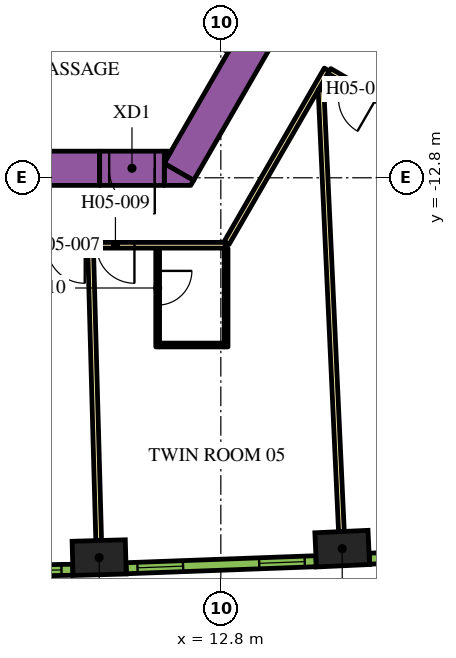
"""IFC4 building model, lengths in metres.
Left out: names, types, materials, properties, quantities, classifications, styles, units other than length and angle.
Written with IfcOpenShell. Run it as: python <this file> out.ifc"""

import sys

from ifc_helpers import new_model, si_unit, direction, frame, frame_2d, origin, origin_2d, place, context, subcontext, project, spatial, polyline, rectangle, outline, extrude, element, fill, save


model = new_model("IFC4")
c1 = context("Model", 3, precision=1e-05, world=origin(), true_north=direction((0.0, 1.0)))
c2 = subcontext(c1, "Body", "Model", "MODEL_VIEW")
j1 = project(units=[si_unit("LENGTHUNIT", "METRE"), si_unit("PLANEANGLEUNIT", "RADIAN")], contexts=[c1])
p1 = place(None, origin())
s1 = spatial("IfcSite", under=j1, at=p1, CompositionType="ELEMENT")
p2 = place(p1, origin())
s2 = spatial("IfcBuilding", under=s1, at=p2, CompositionType="ELEMENT")
p3 = place(p2, frame((0.0, 0.0, 74.4)))
s3 = spatial("IfcBuildingStorey", under=s2, at=p3, CompositionType="ELEMENT", Elevation=74.4)
for number, where, z_axis, x_axis in (
    (1, (9.599, -22.795, 0.0), (0.0, 0.0, 1.0), (1.0, 0.028, 0.0)),
    (2, (15.994, -22.558, 0.0), (0.0, 0.0, 1.0), (0.999, 0.046, 0.0)),
):
    element("IfcColumn", number, at=place(p3, frame(where, z_axis=z_axis, x_axis=x_axis)), inside=s3, PredefinedType="COLUMN", context=c2, shape_type="SweptSolid", body=[
        extrude(rectangle(XDim=1.4, YDim=0.9, at=origin_2d()), origin(), (0.0, 0.0, 1.0), 3.9),
    ])
p4 = place(p3, frame((11.695, -12.644, 0.0), z_axis=(0.0, 0.0, 1.0), x_axis=(0.500010229568, 0.86601949766, 0.0)))
e3 = element("IfcWall", 3, at=p4, inside=s3, PredefinedType="SOLIDWALL", context=c2, shape_type="SweptSolid", body=[
    extrude(rectangle(XDim=9.326, YDim=0.9, at=frame_2d((4.663, 0.0))), origin(), (0.0, 0.0, 1.0), 3.9),
])
p5 = place(p3, origin())
e4 = element("IfcWall", 4, at=p5, inside=s3, PredefinedType="SOLIDWALL", context=c2, shape_type="SweptSolid", body=[
    extrude(outline(polyline([(12.009, -13.0), (11.312, -13.0), (11.312, -12.425), (12.083, -12.871), (12.009, -13.0)])), origin(), (0.0, 0.0, 1.0), 3.9),
])
e5 = element("IfcWall", 5, at=p5, inside=s3, PredefinedType="SOLIDWALL", context=c2, shape_type="SweptSolid", body=[
    extrude(outline(polyline([(11.489, -12.1), (11.312, -12.407), (11.312, -12.1), (11.489, -12.1)])), origin(), (0.0, 0.0, 1.0), 3.9),
])
p6 = place(p3, frame((-12.019, -12.55, 0.0), z_axis=(0.0, 0.0, 1.0), x_axis=(1.0, 0.0, 0.0)))
e6 = element("IfcWall", 6, at=p6, inside=s3, PredefinedType="SOLIDWALL", context=c2, shape_type="SweptSolid", body=[
    extrude(rectangle(XDim=21.63, YDim=0.9, at=frame_2d((10.815, 0.0))), origin(), (0.0, 0.0, 1.0), 3.9),
])
p7 = place(p3, frame((11.312, -12.55, 0.0), z_axis=(0.0, 0.0, 1.0), x_axis=(-1.0, 0.0, 0.0)))
e7 = element("IfcWall", 7, at=p7, inside=s3, PredefinedType="SOLIDWALL", context=c2, shape_type="SweptSolid", body=[
    extrude(rectangle(XDim=1.7, YDim=0.9, at=frame_2d((0.85, 0.0))), origin(), (0.0, 0.0, 1.0), 3.9),
])
p8 = place(p7, frame((0.25, 0.0, 0.0)))
e8 = element("IfcOpeningElement", 8, at=p8, cuts=e7, PredefinedType="OPENING", context=c2, shape_type="SweptSolid", body=[
    extrude(rectangle(XDim=1.2, YDim=2.1, at=frame_2d((0.6, 1.05))), frame((0.0, 0.46, 0.0), z_axis=(0.0, -1.0, 0.0), x_axis=(1.0, 0.0, 0.0)), (0.0, 0.0, 1.0), 0.92),
])
p9 = place(p3, frame((16.412, -8.523, 0.0), z_axis=(0.0, 0.0, 1.0), x_axis=(0.866022197818, -0.500005552856, 0.0)))
e9 = element("IfcWall", 9, at=p9, inside=s3, PredefinedType="PARTITIONING", context=c2, shape_type="SweptSolid", body=[
    extrude(rectangle(XDim=16.224, YDim=0.15, at=frame_2d((8.112, 0.0))), origin(), (0.0, 0.0, 1.0), 2.7),
])
p10 = place(p9, frame((4.223, 0.0, 0.0)))
e10 = element("IfcOpeningElement", 10, at=p10, cuts=e9, PredefinedType="OPENING", context=c2, shape_type="SweptSolid", body=[
    extrude(rectangle(XDim=1.0, YDim=2.1, at=frame_2d((0.5, 1.05))), frame((0.0, 0.085, 0.0), z_axis=(0.0, -1.0, 0.0), x_axis=(1.0, 0.0, 0.0)), (0.0, 0.0, 1.0), 0.17),
])
p11 = place(p3, frame((12.918, -14.575, 0.0), z_axis=(0.0, 0.0, 1.0), x_axis=(-1.0, 0.0, 0.0)))
e11 = element("IfcWall", 11, at=p11, inside=s3, PredefinedType="PARTITIONING", context=c2, shape_type="SweptSolid", body=[
    extrude(rectangle(XDim=25.766, YDim=0.15, at=frame_2d((12.883, 0.0))), origin(), (0.0, 0.0, 1.0), 2.7),
])
p12 = place(p11, frame((21.137, 0.0, 0.0)))
e12 = element("IfcOpeningElement", 12, at=p12, cuts=e11, PredefinedType="OPENING", context=c2, shape_type="SweptSolid", body=[
    extrude(rectangle(XDim=1.0, YDim=2.1, at=frame_2d((0.5, 1.05))), frame((0.0, 0.085, 0.0), z_axis=(0.0, -1.0, 0.0), x_axis=(1.0, 0.0, 0.0)), (0.0, 0.0, 1.0), 0.17),
])
p13 = place(p11, frame((3.699, 0.0, 0.0)))
e13 = element("IfcOpeningElement", 13, at=p13, cuts=e11, PredefinedType="OPENING", context=c2, shape_type="SweptSolid", body=[
    extrude(rectangle(XDim=1.0, YDim=2.1, at=frame_2d((0.5, 1.05))), frame((0.0, 0.085, 0.0), z_axis=(0.0, -1.0, 0.0), x_axis=(1.0, 0.0, 0.0)), (0.0, 0.0, 1.0), 0.17),
])
p14 = place(p11, frame((2.392, 0.0, 0.0)))
e14 = element("IfcOpeningElement", 14, at=p14, cuts=e11, PredefinedType="OPENING", context=c2, shape_type="SweptSolid", body=[
    extrude(rectangle(XDim=1.0, YDim=2.1, at=frame_2d((0.5, 1.05))), frame((0.0, 0.085, 0.0), z_axis=(0.0, -1.0, 0.0), x_axis=(1.0, 0.0, 0.0)), (0.0, 0.0, 1.0), 0.17),
])
p15 = place(p3, frame((15.587, -9.952, 0.0), z_axis=(0.0, 0.0, 1.0), x_axis=(-0.500016618951, -0.866015808616, 0.0)))
e15 = element("IfcWall", 15, at=p15, inside=s3, PredefinedType="PARTITIONING", context=c2, shape_type="SweptSolid", body=[
    extrude(rectangle(XDim=5.268, YDim=0.15, at=frame_2d((2.634, 0.0))), origin(), (0.0, 0.0, 1.0), 2.7),
])
p16 = place(p3, frame((29.638, -18.064, 0.0), z_axis=(0.0, 0.0, 1.0), x_axis=(-0.866026175601, 0.499998663172, 0.0)))
e16 = element("IfcWall", 16, at=p16, inside=s3, PredefinedType="PARTITIONING", context=c2, shape_type="SweptSolid", body=[
    extrude(rectangle(XDim=16.144, YDim=0.15, at=frame_2d((8.072, 0.0))), origin(), (0.0, 0.0, 1.0), 2.7),
])
p17 = place(p16, frame((14.714, 0.0, 0.0)))
e17 = element("IfcOpeningElement", 17, at=p17, cuts=e16, PredefinedType="OPENING", context=c2, shape_type="SweptSolid", body=[
    extrude(rectangle(XDim=1.0, YDim=2.1, at=frame_2d((0.5, 1.05))), frame((0.0, 0.085, 0.0), z_axis=(0.0, -1.0, 0.0), x_axis=(1.0, 0.0, 0.0)), (0.0, 0.0, 1.0), 0.17),
])
p18 = place(p16, frame((7.275, 0.0, 0.0)))
e18 = element("IfcOpeningElement", 18, at=p18, cuts=e16, PredefinedType="OPENING", context=c2, shape_type="SweptSolid", body=[
    extrude(rectangle(XDim=1.0, YDim=2.1, at=frame_2d((0.5, 1.05))), frame((0.0, 0.085, 0.0), z_axis=(0.0, -1.0, 0.0), x_axis=(1.0, 0.0, 0.0)), (0.0, 0.0, 1.0), 0.17),
])
p19 = place(p3, frame((9.586, -22.345, 0.0), z_axis=(0.0, 0.0, 1.0), x_axis=(-0.027722115646, 0.999615668297, 0.0)))
e19 = element("IfcWall", 19, at=p19, inside=s3, PredefinedType="PARTITIONING", context=c2, shape_type="SweptSolid", body=[
    extrude(rectangle(XDim=7.688, YDim=0.15, at=frame_2d((3.844, 0.0))), origin(), (0.0, 0.0, 1.0), 2.7),
])
p20 = place(p3, frame((15.973, -22.109, 0.0), z_axis=(0.0, 0.0, 1.0), x_axis=(-0.046191717129, 0.998932592955, 0.0)))
e20 = element("IfcWall", 20, at=p20, inside=s3, PredefinedType="PARTITIONING", context=c2, shape_type="SweptSolid", body=[
    extrude(rectangle(XDim=11.638, YDim=0.15, at=frame_2d((5.819, 0.0))), origin(), (0.0, 0.0, 1.0), 2.7),
])
p21 = place(p3, frame((11.138, -14.65, 0.0), z_axis=(0.0, 0.0, 1.0), x_axis=(0.0, -1.0, 0.0)))
e21 = element("IfcWall", 21, at=p21, inside=s3, PredefinedType="PARTITIONING", context=c2, shape_type="SweptSolid", body=[
    extrude(rectangle(XDim=2.6, YDim=0.1, at=frame_2d((1.3, 0.0))), origin(), (0.0, 0.0, 1.0), 2.7),
])
p22 = place(p21, frame((0.6, 0.0, 0.0)))
e22 = element("IfcOpeningElement", 22, at=p22, cuts=e21, PredefinedType="OPENING", context=c2, shape_type="SweptSolid", body=[
    extrude(rectangle(XDim=0.9, YDim=2.1, at=frame_2d((0.45, 1.05))), frame((0.0, 0.06, 0.0), z_axis=(0.0, -1.0, 0.0), x_axis=(1.0, 0.0, 0.0)), (0.0, 0.0, 1.0), 0.12),
])
p23 = place(p3, frame((11.188, -17.2, 0.0), z_axis=(0.0, 0.0, 1.0), x_axis=(1.0, 0.0, 0.0)))
e23 = element("IfcWall", 23, at=p23, inside=s3, PredefinedType="PARTITIONING", context=c2, shape_type="SweptSolid", body=[
    extrude(rectangle(XDim=1.7, YDim=0.1, at=frame_2d((0.85, 0.0))), origin(), (0.0, 0.0, 1.0), 2.7),
])
p24 = place(p3, frame((12.938, -14.65, 0.0), z_axis=(0.0, 0.0, 1.0), x_axis=(0.0, -1.0, 0.0)))
e24 = element("IfcWall", 24, at=p24, inside=s3, PredefinedType="PARTITIONING", context=c2, shape_type="SweptSolid", body=[
    extrude(rectangle(XDim=2.6, YDim=0.1, at=frame_2d((1.3, 0.0))), origin(), (0.0, 0.0, 1.0), 2.7),
])
p25 = place(p3, frame((3.906, -23.205, 0.0), z_axis=(0.0, 0.0, 1.0), x_axis=(0.999829529479, 0.018463801951, 0.0)))
e25 = element("IfcWall", 25, at=p25, inside=s3, PredefinedType="SOLIDWALL", context=c2, shape_type="SweptSolid", body=[
    extrude(rectangle(XDim=4.998, YDim=0.29, at=frame_2d((2.499, 0.0))), origin(), (0.0, 0.0, 1.0), 3.6),
])
p26 = place(p25, frame((0.297, 0.0, 0.9)))
e26 = element("IfcOpeningElement", 26, at=p26, cuts=e25, PredefinedType="OPENING", context=c2, shape_type="SweptSolid", body=[
    extrude(rectangle(XDim=1.2, YDim=2.15, at=frame_2d((0.6, 1.075))), frame((0.0, 0.155, 0.0), z_axis=(0.0, -1.0, 0.0), x_axis=(1.0, 0.0, 0.0)), (0.0, 0.0, 1.0), 0.31),
])
p27 = place(p25, frame((3.501, 0.0, 0.9)))
e27 = element("IfcOpeningElement", 27, at=p27, cuts=e25, PredefinedType="OPENING", context=c2, shape_type="SweptSolid", body=[
    extrude(rectangle(XDim=1.2, YDim=2.15, at=frame_2d((0.6, 1.075))), frame((0.0, 0.155, 0.0), z_axis=(0.0, -1.0, 0.0), x_axis=(1.0, 0.0, 0.0)), (0.0, 0.0, 1.0), 0.31),
])
p28 = place(p3, frame((10.31, -23.074, 0.0), z_axis=(0.0, 0.0, 1.0), x_axis=(0.999317974969, 0.036926750529, 0.0)))
e28 = element("IfcWall", 28, at=p28, inside=s3, PredefinedType="SOLIDWALL", context=c2, shape_type="SweptSolid", body=[
    extrude(rectangle(XDim=4.998, YDim=0.29, at=frame_2d((2.499, 0.0))), origin(), (0.0, 0.0, 1.0), 3.6),
])
p29 = place(p28, frame((0.297, 0.0, 0.9)))
e29 = element("IfcOpeningElement", 29, at=p29, cuts=e28, PredefinedType="OPENING", context=c2, shape_type="SweptSolid", body=[
    extrude(rectangle(XDim=1.2, YDim=2.15, at=frame_2d((0.6, 1.075))), frame((0.0, 0.155, 0.0), z_axis=(0.0, -1.0, 0.0), x_axis=(1.0, 0.0, 0.0)), (0.0, 0.0, 1.0), 0.31),
])
p30 = place(p28, frame((3.501, 0.0, 0.9)))
e30 = element("IfcOpeningElement", 30, at=p30, cuts=e28, PredefinedType="OPENING", context=c2, shape_type="SweptSolid", body=[
    extrude(rectangle(XDim=1.2, YDim=2.15, at=frame_2d((0.6, 1.075))), frame((0.0, 0.155, 0.0), z_axis=(0.0, -1.0, 0.0), x_axis=(1.0, 0.0, 0.0)), (0.0, 0.0, 1.0), 0.31),
])
p31 = place(p3, frame((16.711, -22.824, 0.0), z_axis=(0.0, 0.0, 1.0), x_axis=(0.998464708705, 0.055391564976, 0.0)))
e31 = element("IfcWall", 31, at=p31, inside=s3, PredefinedType="SOLIDWALL", context=c2, shape_type="SweptSolid", body=[
    extrude(rectangle(XDim=4.998, YDim=0.29, at=frame_2d((2.499, 0.0))), origin(), (0.0, 0.0, 1.0), 3.6),
])
p32 = place(p31, frame((0.297, 0.0, 0.9)))
e32 = element("IfcOpeningElement", 32, at=p32, cuts=e31, PredefinedType="OPENING", context=c2, shape_type="SweptSolid", body=[
    extrude(rectangle(XDim=1.2, YDim=2.15, at=frame_2d((0.6, 1.075))), frame((0.0, 0.155, 0.0), z_axis=(0.0, -1.0, 0.0), x_axis=(1.0, 0.0, 0.0)), (0.0, 0.0, 1.0), 0.31),
])
p33 = place(p31, frame((3.501, 0.0, 0.9)))
e33 = element("IfcOpeningElement", 33, at=p33, cuts=e31, PredefinedType="OPENING", context=c2, shape_type="SweptSolid", body=[
    extrude(rectangle(XDim=1.2, YDim=2.15, at=frame_2d((0.6, 1.075))), frame((0.0, 0.155, 0.0), z_axis=(0.0, -1.0, 0.0), x_axis=(1.0, 0.0, 0.0)), (0.0, 0.0, 1.0), 0.31),
])
p34 = place(p8, origin())
e34 = element("IfcDoor", 34, at=p34, inside=s3, OperationType="SINGLE_SWING_LEFT", PredefinedType="DOOR", context=c2, shape_type="SweptSolid", body=[
    extrude(rectangle(XDim=1.2, YDim=2.1, at=frame_2d((0.6, 1.05))), frame((0.0, 0.025, 0.0), z_axis=(0.0, -1.0, 0.0), x_axis=(1.0, 0.0, 0.0)), (0.0, 0.0, 1.0), 0.05),
])
fill(e8, e34)
p35 = place(p13, origin())
e35 = element("IfcDoor", 35, at=p35, inside=s3, OperationType="SINGLE_SWING_LEFT", PredefinedType="DOOR", context=c2, shape_type="SweptSolid", body=[
    extrude(rectangle(XDim=1.0, YDim=2.1, at=frame_2d((0.5, 1.05))), frame((0.0, 0.025, 0.0), z_axis=(0.0, -1.0, 0.0), x_axis=(1.0, 0.0, 0.0)), (0.0, 0.0, 1.0), 0.05),
])
fill(e13, e35)
p36 = place(p14, origin())
e36 = element("IfcDoor", 36, at=p36, inside=s3, OperationType="SINGLE_SWING_RIGHT", PredefinedType="DOOR", context=c2, shape_type="SweptSolid", body=[
    extrude(rectangle(XDim=1.0, YDim=2.1, at=frame_2d((0.5, 1.05))), frame((0.0, 0.025, 0.0), z_axis=(0.0, -1.0, 0.0), x_axis=(1.0, 0.0, 0.0)), (0.0, 0.0, 1.0), 0.05),
])
fill(e14, e36)
p37 = place(p22, origin())
e37 = element("IfcDoor", 37, at=p37, inside=s3, OperationType="SINGLE_SWING_LEFT", PredefinedType="DOOR", context=c2, shape_type="SweptSolid", body=[
    extrude(rectangle(XDim=0.9, YDim=2.1, at=frame_2d((0.45, 1.05))), frame((0.0, 0.025, 0.0), z_axis=(0.0, -1.0, 0.0), x_axis=(1.0, 0.0, 0.0)), (0.0, 0.0, 1.0), 0.05),
])
fill(e22, e37)
p38 = place(p17, origin())
e38 = element("IfcDoor", 38, at=p38, inside=s3, OperationType="SINGLE_SWING_RIGHT", PredefinedType="DOOR", context=c2, shape_type="SweptSolid", body=[
    extrude(rectangle(XDim=1.0, YDim=2.1, at=frame_2d((0.5, 1.05))), frame((0.0, 0.025, 0.0), z_axis=(0.0, -1.0, 0.0), x_axis=(1.0, 0.0, 0.0)), (0.0, 0.0, 1.0), 0.05),
])
fill(e17, e38)
p39 = place(p27, origin())
e39 = element("IfcWindow", 39, at=p39, inside=s3, PartitioningType="DOUBLE_PANEL_VERTICAL", PredefinedType="WINDOW", context=c2, shape_type="SweptSolid", body=[
    extrude(rectangle(XDim=1.2, YDim=2.15, at=frame_2d((0.6, 1.075))), frame((0.0, 0.015, 0.0), z_axis=(0.0, -1.0, 0.0), x_axis=(1.0, 0.0, 0.0)), (0.0, 0.0, 1.0), 0.06),
])
fill(e27, e39)
p40 = place(p29, origin())
e40 = element("IfcWindow", 40, at=p40, inside=s3, PartitioningType="DOUBLE_PANEL_VERTICAL", PredefinedType="WINDOW", context=c2, shape_type="SweptSolid", body=[
    extrude(rectangle(XDim=1.2, YDim=2.15, at=frame_2d((0.6, 1.075))), frame((0.0, 0.015, 0.0), z_axis=(0.0, -1.0, 0.0), x_axis=(1.0, 0.0, 0.0)), (0.0, 0.0, 1.0), 0.06),
])
fill(e29, e40)
p41 = place(p30, origin())
e41 = element("IfcWindow", 41, at=p41, inside=s3, PartitioningType="DOUBLE_PANEL_VERTICAL", PredefinedType="WINDOW", context=c2, shape_type="SweptSolid", body=[
    extrude(rectangle(XDim=1.2, YDim=2.15, at=frame_2d((0.6, 1.075))), frame((0.0, 0.015, 0.0), z_axis=(0.0, -1.0, 0.0), x_axis=(1.0, 0.0, 0.0)), (0.0, 0.0, 1.0), 0.06),
])
fill(e30, e41)
save(model, sys.argv[1])
